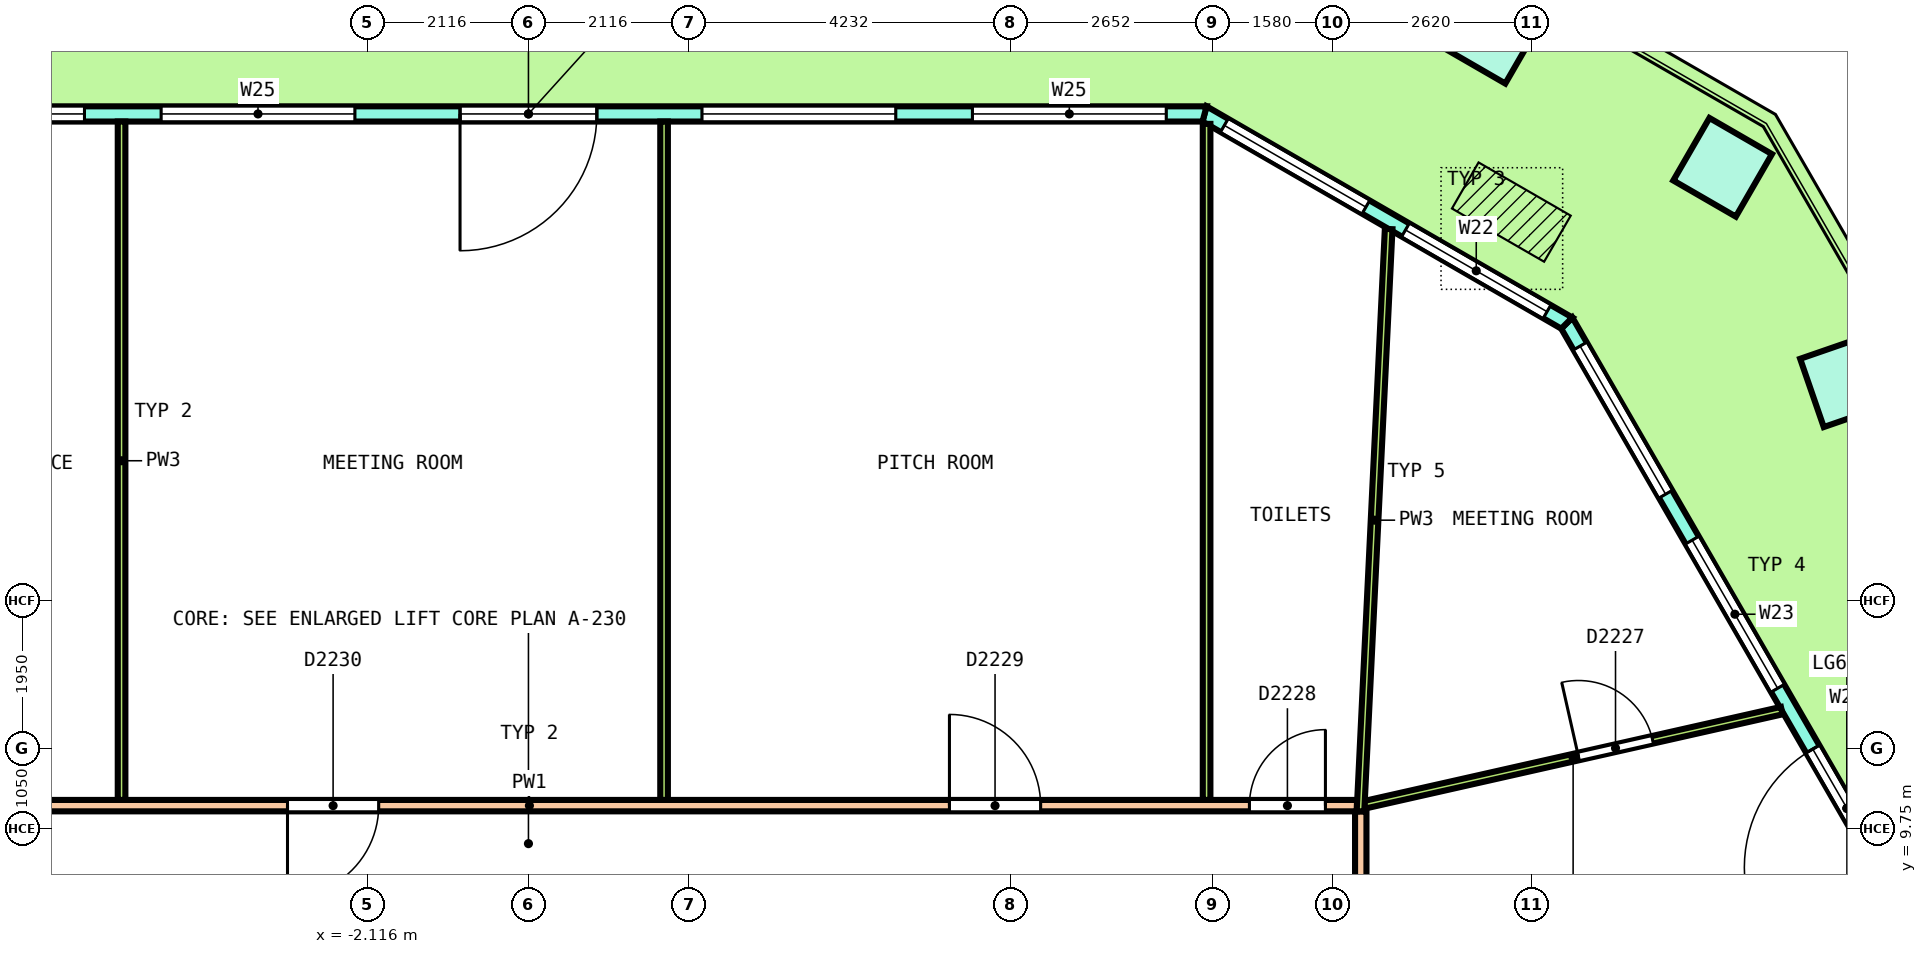
"""IFC4 building model, lengths in metres.
Left out: names, types, materials, properties, quantities, classifications, styles, units other than length and angle.
Written with IfcOpenShell. Run it as: python <this file> out.ifc"""

import sys

from ifc_helpers import new_model, si_unit, direction, frame, frame_2d, origin, origin_2d, place, context, subcontext, project, spatial, polyline, rectangle, outline, extrude, element, fill, save


model = new_model("IFC4")
c1 = context("Model", 3, precision=1e-05, world=origin(), true_north=direction((0.0, 1.0)))
c2 = subcontext(c1, "Body", "Model", "MODEL_VIEW")
j1 = project(units=[si_unit("LENGTHUNIT", "METRE"), si_unit("PLANEANGLEUNIT", "RADIAN")], contexts=[c1])
p1 = place(None, origin())
s1 = spatial("IfcSite", under=j1, at=p1, CompositionType="ELEMENT")
p2 = place(p1, origin())
s2 = spatial("IfcBuilding", under=s1, at=p2, CompositionType="ELEMENT")
p3 = place(p2, frame((0.0, 0.0, 291.0)))
s3 = spatial("IfcBuildingStorey", under=s2, at=p3, CompositionType="ELEMENT", Elevation=291.0)
p4 = place(p3, frame((17.335, 15.635, 0.0), z_axis=(0.032624119908, 0.006284154245, 0.999447935715), x_axis=(-0.499397268022, 0.866305114166, 0.010854393717)))
e1 = element("IfcColumn", 1, at=p4, inside=s3, PredefinedType="COLUMN", context=c2, shape_type="SweptSolid", body=[
    extrude(rectangle(XDim=0.95, YDim=0.95, at=origin_2d()), origin(), (0.0, 0.0, 1.0), 3.652),
])
for number, where, z_axis, x_axis in (
    (2, (15.711, 18.448, 0.0), (0.036, 0.0, 0.999), (-0.865, 0.5, 0.031)),
    (3, (12.678, 20.199, 0.0), (0.036, 0.0, 0.999), (-0.865, 0.5, 0.031)),
):
    element("IfcColumn", number, at=place(p3, frame(where, z_axis=z_axis, x_axis=x_axis)), inside=s3, PredefinedType="COLUMN", context=c2, shape_type="SweptSolid", body=[
        extrude(rectangle(XDim=0.95, YDim=0.95, at=origin_2d()), origin(), (0.0, 0.0, 1.0), 3.652),
    ])
p5 = place(p3, frame((21.032, 3.632, 0.0), z_axis=(0.0, 0.0, 1.0), x_axis=(-0.50000248076, 0.866023971512, 0.0)))
e4 = element("IfcWall", 4, at=p5, inside=s3, PredefinedType="SOLIDWALL", context=c2, shape_type="SweptSolid", body=[
    extrude(outline(polyline([(-0.027, -0.1), (1.03, -0.1), (2.087, -0.1), (3.144, -0.1), (4.2, -0.1), (5.257, -0.1), (6.314, -0.1), (7.371, -0.1), (8.428, -0.1), (9.484, -0.1), (10.541, -0.1), (11.598, -0.1), (12.655, -0.1), (13.712, -0.1), (14.769, -0.1), (14.715, 0.1), (13.666, 0.1), (12.616, 0.1), (11.567, 0.1), (10.518, 0.1), (9.469, 0.1), (8.42, 0.1), (7.371, 0.1), (6.322, 0.1), (5.272, 0.1), (4.223, 0.1), (3.174, 0.1), (2.125, 0.1), (1.076, 0.1), (0.027, 0.1), (-0.027, -0.1)])), origin(), (0.0, 0.0, 1.0), 3.7),
])
p6 = place(p5, frame((0.349, 0.0, 0.1)))
e5 = element("IfcOpeningElement", 5, at=p6, cuts=e4, PredefinedType="OPENING", context=c2, shape_type="SweptSolid", body=[
    extrude(rectangle(XDim=2.25, YDim=2.75, at=frame_2d((1.125, 1.375))), frame((0.0, 0.11, 0.0), z_axis=(0.0, -1.0, 0.0), x_axis=(1.0, 0.0, 0.0)), (0.0, 0.0, 1.0), 0.22),
])
p7 = place(p5, frame((3.298, 0.0, 0.1)))
e6 = element("IfcOpeningElement", 6, at=p7, cuts=e4, PredefinedType="OPENING", context=c2, shape_type="SweptSolid", body=[
    extrude(rectangle(XDim=2.25, YDim=2.75, at=frame_2d((1.125, 1.375))), frame((0.0, 0.11, 0.0), z_axis=(0.0, -1.0, 0.0), x_axis=(1.0, 0.0, 0.0)), (0.0, 0.0, 1.0), 0.22),
])
p8 = place(p5, frame((6.471, 0.0, 0.0)))
e7 = element("IfcOpeningElement", 7, at=p8, cuts=e4, PredefinedType="OPENING", context=c2, shape_type="SweptSolid", body=[
    extrude(rectangle(XDim=1.8, YDim=2.4, at=frame_2d((0.9, 1.2))), frame((0.0, 0.11, 0.0), z_axis=(0.0, -1.0, 0.0), x_axis=(1.0, 0.0, 0.0)), (0.0, 0.0, 1.0), 0.22),
])
p9 = place(p5, frame((6.471, 0.0, 2.55)))
e8 = element("IfcOpeningElement", 8, at=p9, cuts=e4, PredefinedType="OPENING", context=c2, shape_type="SweptSolid", body=[
    extrude(rectangle(XDim=1.8, YDim=0.3, at=frame_2d((0.9, 0.15))), frame((0.0, 0.11, 0.0), z_axis=(0.0, -1.0, 0.0), x_axis=(1.0, 0.0, 0.0)), (0.0, 0.0, 1.0), 0.22),
])
p10 = place(p5, frame((9.194, 0.0, 0.1)))
e9 = element("IfcOpeningElement", 9, at=p10, cuts=e4, PredefinedType="OPENING", context=c2, shape_type="SweptSolid", body=[
    extrude(rectangle(XDim=2.25, YDim=2.75, at=frame_2d((1.125, 1.375))), frame((0.0, 0.11, 0.0), z_axis=(0.0, -1.0, 0.0), x_axis=(1.0, 0.0, 0.0)), (0.0, 0.0, 1.0), 0.22),
])
p11 = place(p5, frame((12.143, 0.0, 0.1)))
e10 = element("IfcOpeningElement", 10, at=p11, cuts=e4, PredefinedType="OPENING", context=c2, shape_type="SweptSolid", body=[
    extrude(rectangle(XDim=2.25, YDim=2.75, at=frame_2d((1.125, 1.375))), frame((0.0, 0.11, 0.0), z_axis=(0.0, -1.0, 0.0), x_axis=(1.0, 0.0, 0.0)), (0.0, 0.0, 1.0), 0.22),
])
p12 = place(p3, frame((13.661, 16.398, 0.0), z_axis=(0.0, 0.0, 1.0), x_axis=(-0.866014926636, 0.500018146515, 0.0)))
e11 = element("IfcWall", 11, at=p12, inside=s3, PredefinedType="SOLIDWALL", context=c2, shape_type="SweptSolid", body=[
    extrude(outline(polyline([(-0.027, -0.1), (1.084, -0.1), (2.196, -0.1), (3.307, -0.1), (4.419, -0.1), (5.53, -0.1), (5.476, 0.1), (4.386, 0.1), (3.297, 0.1), (2.207, 0.1), (1.117, 0.1), (0.027, 0.1), (-0.027, -0.1)])), origin(), (0.0, 0.0, 1.0), 3.7),
])
p13 = place(p12, frame((0.301, 0.0, 0.1)))
e12 = element("IfcOpeningElement", 12, at=p13, cuts=e11, PredefinedType="OPENING", context=c2, shape_type="SweptSolid", body=[
    extrude(rectangle(XDim=2.15, YDim=2.75, at=frame_2d((1.075, 1.375))), frame((0.0, 0.11, 0.0), z_axis=(0.0, -1.0, 0.0), x_axis=(1.0, 0.0, 0.0)), (0.0, 0.0, 1.0), 0.22),
])
p14 = place(p12, frame((3.052, 0.0, 0.1)))
e13 = element("IfcOpeningElement", 13, at=p14, cuts=e11, PredefinedType="OPENING", context=c2, shape_type="SweptSolid", body=[
    extrude(rectangle(XDim=2.15, YDim=2.75, at=frame_2d((1.075, 1.375))), frame((0.0, 0.11, 0.0), z_axis=(0.0, -1.0, 0.0), x_axis=(1.0, 0.0, 0.0)), (0.0, 0.0, 1.0), 0.22),
])
p15 = place(p3, frame((8.895, 19.15, 0.0), z_axis=(0.0, 0.0, 1.0), x_axis=(-1.0, 0.0, 0.0)))
e14 = element("IfcWall", 14, at=p15, inside=s3, PredefinedType="SOLIDWALL", context=c2, shape_type="SweptSolid", body=[
    extrude(outline(polyline([(-0.027, -0.1), (1.023, -0.1), (2.073, -0.1), (3.122, -0.1), (4.172, -0.1), (5.221, -0.1), (6.271, -0.1), (7.321, -0.1), (8.37, -0.1), (9.42, -0.1), (10.469, -0.1), (11.519, -0.1), (12.569, -0.1), (13.618, -0.1), (14.668, -0.1), (15.718, -0.1), (16.767, -0.1), (17.817, -0.1), (17.763, 0.1), (16.72, 0.1), (15.677, 0.1), (14.633, 0.1), (13.59, 0.1), (12.547, 0.1), (11.503, 0.1), (10.46, 0.1), (9.417, 0.1), (8.373, 0.1), (7.33, 0.1), (6.287, 0.1), (5.243, 0.1), (4.2, 0.1), (3.157, 0.1), (2.114, 0.1), (1.07, 0.1), (0.027, 0.1), (-0.027, -0.1)])), origin(), (0.0, 0.0, 1.0), 3.7),
])
p16 = place(p15, frame((0.504, 0.0, 0.1)))
e15 = element("IfcOpeningElement", 15, at=p16, cuts=e14, PredefinedType="OPENING", context=c2, shape_type="SweptSolid", body=[
    extrude(rectangle(XDim=2.55, YDim=2.75, at=frame_2d((1.275, 1.375))), frame((0.0, 0.11, 0.0), z_axis=(0.0, -1.0, 0.0), x_axis=(1.0, 0.0, 0.0)), (0.0, 0.0, 1.0), 0.22),
])
p17 = place(p15, frame((4.062, 0.0, 0.1)))
e16 = element("IfcOpeningElement", 16, at=p17, cuts=e14, PredefinedType="OPENING", context=c2, shape_type="SweptSolid", body=[
    extrude(rectangle(XDim=2.55, YDim=2.75, at=frame_2d((1.275, 1.375))), frame((0.0, 0.11, 0.0), z_axis=(0.0, -1.0, 0.0), x_axis=(1.0, 0.0, 0.0)), (0.0, 0.0, 1.0), 0.22),
])
p18 = place(p15, frame((7.995, 0.0, 0.0)))
e17 = element("IfcOpeningElement", 17, at=p18, cuts=e14, PredefinedType="OPENING", context=c2, shape_type="SweptSolid", body=[
    extrude(rectangle(XDim=1.8, YDim=2.4, at=frame_2d((0.9, 1.2))), frame((0.0, 0.11, 0.0), z_axis=(0.0, -1.0, 0.0), x_axis=(1.0, 0.0, 0.0)), (0.0, 0.0, 1.0), 0.22),
])
p19 = place(p15, frame((7.995, 0.0, 2.55)))
e18 = element("IfcOpeningElement", 18, at=p19, cuts=e14, PredefinedType="OPENING", context=c2, shape_type="SweptSolid", body=[
    extrude(rectangle(XDim=1.8, YDim=0.3, at=frame_2d((0.9, 0.15))), frame((0.0, 0.11, 0.0), z_axis=(0.0, -1.0, 0.0), x_axis=(1.0, 0.0, 0.0)), (0.0, 0.0, 1.0), 0.22),
])
p20 = place(p15, frame((11.178, 0.0, 0.1)))
e19 = element("IfcOpeningElement", 19, at=p20, cuts=e14, PredefinedType="OPENING", context=c2, shape_type="SweptSolid", body=[
    extrude(rectangle(XDim=2.55, YDim=2.75, at=frame_2d((1.275, 1.375))), frame((0.0, 0.11, 0.0), z_axis=(0.0, -1.0, 0.0), x_axis=(1.0, 0.0, 0.0)), (0.0, 0.0, 1.0), 0.22),
])
p21 = place(p15, frame((14.736, 0.0, 0.1)))
e20 = element("IfcOpeningElement", 20, at=p21, cuts=e14, PredefinedType="OPENING", context=c2, shape_type="SweptSolid", body=[
    extrude(rectangle(XDim=2.55, YDim=2.75, at=frame_2d((1.275, 1.375))), frame((0.0, 0.11, 0.0), z_axis=(0.0, -1.0, 0.0), x_axis=(1.0, 0.0, 0.0)), (0.0, 0.0, 1.0), 0.22),
])
p22 = place(p3, frame((10.95, -7.025, 0.0), z_axis=(0.0, 0.0, 1.0), x_axis=(0.0, 1.0, 0.0)))
e21 = element("IfcWall", 21, at=p22, inside=s3, PredefinedType="PARTITIONING", context=c2, shape_type="SweptSolid", body=[
    extrude(rectangle(XDim=17.0, YDim=0.15, at=frame_2d((8.5, 0.0))), origin(), (0.0, 0.0, 1.0), 2.9),
])
p23 = place(p22, frame((8.632, 0.0, 0.0)))
e22 = element("IfcOpeningElement", 22, at=p23, cuts=e21, PredefinedType="OPENING", context=c2, shape_type="SweptSolid", body=[
    extrude(rectangle(XDim=1.0, YDim=2.1, at=frame_2d((0.5, 1.05))), frame((0.0, 0.085, 0.0), z_axis=(0.0, -1.0, 0.0), x_axis=(1.0, 0.0, 0.0)), (0.0, 0.0, 1.0), 0.17),
])
p24 = place(p22, frame((12.605, 0.0, 0.0)))
e23 = element("IfcOpeningElement", 23, at=p24, cuts=e21, PredefinedType="OPENING", context=c2, shape_type="SweptSolid", body=[
    extrude(rectangle(XDim=1.2, YDim=2.1, at=frame_2d((0.6, 1.05))), frame((0.0, 0.085, 0.0), z_axis=(0.0, -1.0, 0.0), x_axis=(1.0, 0.0, 0.0)), (0.0, 0.0, 1.0), 0.17),
])
p25 = place(p22, frame((2.733, 0.0, 0.0)))
e24 = element("IfcOpeningElement", 24, at=p25, cuts=e21, PredefinedType="OPENING", context=c2, shape_type="SweptSolid", body=[
    extrude(rectangle(XDim=1.0, YDim=2.1, at=frame_2d((0.5, 1.05))), frame((0.0, 0.085, 0.0), z_axis=(0.0, -1.0, 0.0), x_axis=(1.0, 0.0, 0.0)), (0.0, 0.0, 1.0), 0.17),
])
p26 = place(p22, frame((5.854, 0.0, 0.0)))
e25 = element("IfcOpeningElement", 25, at=p26, cuts=e21, PredefinedType="OPENING", context=c2, shape_type="SweptSolid", body=[
    extrude(rectangle(XDim=1.0, YDim=2.1, at=frame_2d((0.5, 1.05))), frame((0.0, 0.085, 0.0), z_axis=(0.0, -1.0, 0.0), x_axis=(1.0, 0.0, 0.0)), (0.0, 0.0, 1.0), 0.17),
])
p27 = place(p3, frame((-10.875, 10.05, 0.0), z_axis=(0.0, 0.0, 1.0), x_axis=(1.0, 0.0, 0.0)))
e26 = element("IfcWall", 26, at=p27, inside=s3, PredefinedType="PARTITIONING", context=c2, shape_type="SweptSolid", body=[
    extrude(rectangle(XDim=21.775, YDim=0.15, at=frame_2d((10.887, 0.0))), origin(), (0.0, 0.0, 1.0), 2.9),
])
p28 = place(p27, frame((20.36, 0.0, 0.0)))
e27 = element("IfcOpeningElement", 27, at=p28, cuts=e26, PredefinedType="OPENING", context=c2, shape_type="SweptSolid", body=[
    extrude(rectangle(XDim=1.0, YDim=2.1, at=frame_2d((0.5, 1.05))), frame((0.0, 0.085, 0.0), z_axis=(0.0, -1.0, 0.0), x_axis=(1.0, 0.0, 0.0)), (0.0, 0.0, 1.0), 0.17),
])
p29 = place(p27, frame((16.414, 0.0, 0.0)))
e28 = element("IfcOpeningElement", 28, at=p29, cuts=e26, PredefinedType="OPENING", context=c2, shape_type="SweptSolid", body=[
    extrude(rectangle(XDim=1.2, YDim=2.1, at=frame_2d((0.6, 1.05))), frame((0.0, 0.085, 0.0), z_axis=(0.0, -1.0, 0.0), x_axis=(1.0, 0.0, 0.0)), (0.0, 0.0, 1.0), 0.17),
])
p30 = place(p27, frame((7.705, 0.0, 0.0)))
e29 = element("IfcOpeningElement", 29, at=p30, cuts=e26, PredefinedType="OPENING", context=c2, shape_type="SweptSolid", body=[
    extrude(rectangle(XDim=1.2, YDim=2.1, at=frame_2d((0.6, 1.05))), frame((0.0, 0.085, 0.0), z_axis=(0.0, -1.0, 0.0), x_axis=(1.0, 0.0, 0.0)), (0.0, 0.0, 1.0), 0.17),
])
p31 = place(p27, frame((2.771, 0.0, 0.0)))
e30 = element("IfcOpeningElement", 30, at=p31, cuts=e26, PredefinedType="OPENING", context=c2, shape_type="SweptSolid", body=[
    extrude(rectangle(XDim=1.0, YDim=2.1, at=frame_2d((0.5, 1.05))), frame((0.0, 0.085, 0.0), z_axis=(0.0, -1.0, 0.0), x_axis=(1.0, 0.0, 0.0)), (0.0, 0.0, 1.0), 0.17),
])
p32 = place(p3, frame((10.999, 10.061, 0.0), z_axis=(0.0, 0.0, 1.0), x_axis=(0.975459036703, 0.220180988541, 0.0)))
e31 = element("IfcWall", 31, at=p32, inside=s3, PredefinedType="PARTITIONING", context=c2, shape_type="SweptSolid", body=[
    extrude(rectangle(XDim=5.628, YDim=0.1, at=frame_2d((2.814, 0.0))), origin(), (0.0, 0.0, 1.0), 2.9),
])
p33 = place(p32, frame((2.886, 0.0, 0.0)))
e32 = element("IfcOpeningElement", 32, at=p33, cuts=e31, PredefinedType="OPENING", context=c2, shape_type="SweptSolid", body=[
    extrude(rectangle(XDim=1.0, YDim=2.1, at=frame_2d((0.5, 1.05))), frame((0.0, 0.06, 0.0), z_axis=(0.0, -1.0, 0.0), x_axis=(1.0, 0.0, 0.0)), (0.0, 0.0, 1.0), 0.12),
])
p34 = place(p3, frame((10.946, 9.975, 0.0), z_axis=(0.0, 0.0, 1.0), x_axis=(0.048351551891, 0.998830379709, 0.0)))
e33 = element("IfcWall", 33, at=p34, inside=s3, PredefinedType="PARTITIONING", context=c2, shape_type="SweptSolid", body=[
    extrude(rectangle(XDim=7.67, YDim=0.1, at=frame_2d((3.835, 0.0))), origin(), (0.0, 0.0, 1.0), 2.9),
])
p35 = place(p3, frame((8.922, 10.125, 0.0), z_axis=(0.0, 0.0, 1.0), x_axis=(0.0, 1.0, 0.0)))
e34 = element("IfcWall", 34, at=p35, inside=s3, PredefinedType="PARTITIONING", context=c2, shape_type="SweptSolid", body=[
    extrude(rectangle(XDim=8.894, YDim=0.1, at=frame_2d((4.447, 0.0))), origin(), (0.0, 0.0, 1.0), 2.9),
])
for number, where, z_axis, x_axis in (
    (35, (1.784, 10.125, 0.0), (0.0, 0.0, 1.0), (0.0, 1.0, 0.0)),
    (36, (-5.353, 10.125, 0.0), (0.0, 0.0, 1.0), (0.0, 1.0, 0.0)),
):
    element("IfcWall", number, at=place(p3, frame(where, z_axis=z_axis, x_axis=x_axis)), inside=s3, PredefinedType="PARTITIONING", context=c2, shape_type="SweptSolid", body=[
        extrude(rectangle(XDim=8.925, YDim=0.1, at=frame_2d((4.462, 0.0))), origin(), (0.0, 0.0, 1.0), 2.9),
    ])
p36 = place(p8, origin())
e37 = element("IfcDoor", 37, at=p36, inside=s3, OperationType="DOUBLE_DOOR_SINGLE_SWING", PredefinedType="DOOR", context=c2, shape_type="SweptSolid", body=[
    extrude(rectangle(XDim=1.8, YDim=2.4, at=frame_2d((0.9, 1.2))), frame((0.0, 0.025, 0.0), z_axis=(0.0, -1.0, 0.0), x_axis=(1.0, 0.0, 0.0)), (0.0, 0.0, 1.0), 0.05),
])
fill(e7, e37)
p37 = place(p9, origin())
e38 = element("IfcWindow", 38, at=p37, inside=s3, PartitioningType="SINGLE_PANEL", PredefinedType="WINDOW", context=c2, shape_type="SweptSolid", body=[
    extrude(rectangle(XDim=1.8, YDim=0.3, at=frame_2d((0.9, 0.15))), frame((0.0, 0.03, 0.0), z_axis=(0.0, -1.0, 0.0), x_axis=(1.0, 0.0, 0.0)), (0.0, 0.0, 1.0), 0.06),
])
fill(e8, e38)
p38 = place(p10, origin())
e39 = element("IfcWindow", 39, at=p38, inside=s3, PartitioningType="SINGLE_PANEL", PredefinedType="WINDOW", context=c2, shape_type="SweptSolid", body=[
    extrude(rectangle(XDim=2.25, YDim=2.75, at=frame_2d((1.125, 1.375))), frame((0.0, 0.03, 0.0), z_axis=(0.0, -1.0, 0.0), x_axis=(1.0, 0.0, 0.0)), (0.0, 0.0, 1.0), 0.06),
])
fill(e9, e39)
p39 = place(p11, origin())
e40 = element("IfcWindow", 40, at=p39, inside=s3, PartitioningType="SINGLE_PANEL", PredefinedType="WINDOW", context=c2, shape_type="SweptSolid", body=[
    extrude(rectangle(XDim=2.25, YDim=2.75, at=frame_2d((1.125, 1.375))), frame((0.0, 0.03, 0.0), z_axis=(0.0, -1.0, 0.0), x_axis=(1.0, 0.0, 0.0)), (0.0, 0.0, 1.0), 0.06),
])
fill(e10, e40)
p40 = place(p13, origin())
e41 = element("IfcWindow", 41, at=p40, inside=s3, PartitioningType="SINGLE_PANEL", PredefinedType="WINDOW", context=c2, shape_type="SweptSolid", body=[
    extrude(rectangle(XDim=2.15, YDim=2.75, at=frame_2d((1.075, 1.375))), frame((0.0, 0.03, 0.0), z_axis=(0.0, -1.0, 0.0), x_axis=(1.0, 0.0, 0.0)), (0.0, 0.0, 1.0), 0.06),
])
fill(e12, e41)
p41 = place(p14, origin())
e42 = element("IfcWindow", 42, at=p41, inside=s3, PartitioningType="SINGLE_PANEL", PredefinedType="WINDOW", context=c2, shape_type="SweptSolid", body=[
    extrude(rectangle(XDim=2.15, YDim=2.75, at=frame_2d((1.075, 1.375))), frame((0.0, 0.03, 0.0), z_axis=(0.0, -1.0, 0.0), x_axis=(1.0, 0.0, 0.0)), (0.0, 0.0, 1.0), 0.06),
])
fill(e13, e42)
p42 = place(p16, origin())
e43 = element("IfcWindow", 43, at=p42, inside=s3, PartitioningType="SINGLE_PANEL", PredefinedType="WINDOW", context=c2, shape_type="SweptSolid", body=[
    extrude(rectangle(XDim=2.55, YDim=2.75, at=frame_2d((1.275, 1.375))), frame((0.0, 0.03, 0.0), z_axis=(0.0, -1.0, 0.0), x_axis=(1.0, 0.0, 0.0)), (0.0, 0.0, 1.0), 0.06),
])
fill(e15, e43)
p43 = place(p17, origin())
e44 = element("IfcWindow", 44, at=p43, inside=s3, PartitioningType="SINGLE_PANEL", PredefinedType="WINDOW", context=c2, shape_type="SweptSolid", body=[
    extrude(rectangle(XDim=2.55, YDim=2.75, at=frame_2d((1.275, 1.375))), frame((0.0, 0.03, 0.0), z_axis=(0.0, -1.0, 0.0), x_axis=(1.0, 0.0, 0.0)), (0.0, 0.0, 1.0), 0.06),
])
fill(e16, e44)
p44 = place(p18, origin())
e45 = element("IfcDoor", 45, at=p44, inside=s3, OperationType="DOUBLE_DOOR_SINGLE_SWING", PredefinedType="DOOR", context=c2, shape_type="SweptSolid", body=[
    extrude(rectangle(XDim=1.8, YDim=2.4, at=frame_2d((0.9, 1.2))), frame((0.0, 0.025, 0.0), z_axis=(0.0, -1.0, 0.0), x_axis=(1.0, 0.0, 0.0)), (0.0, 0.0, 1.0), 0.05),
])
fill(e17, e45)
p45 = place(p19, origin())
e46 = element("IfcWindow", 46, at=p45, inside=s3, PartitioningType="SINGLE_PANEL", PredefinedType="WINDOW", context=c2, shape_type="SweptSolid", body=[
    extrude(rectangle(XDim=1.8, YDim=0.3, at=frame_2d((0.9, 0.15))), frame((0.0, 0.03, 0.0), z_axis=(0.0, -1.0, 0.0), x_axis=(1.0, 0.0, 0.0)), (0.0, 0.0, 1.0), 0.06),
])
fill(e18, e46)
p46 = place(p20, origin())
e47 = element("IfcWindow", 47, at=p46, inside=s3, PartitioningType="SINGLE_PANEL", PredefinedType="WINDOW", context=c2, shape_type="SweptSolid", body=[
    extrude(rectangle(XDim=2.55, YDim=2.75, at=frame_2d((1.275, 1.375))), frame((0.0, 0.03, 0.0), z_axis=(0.0, -1.0, 0.0), x_axis=(1.0, 0.0, 0.0)), (0.0, 0.0, 1.0), 0.06),
])
fill(e19, e47)
p47 = place(p21, origin())
e48 = element("IfcWindow", 48, at=p47, inside=s3, PartitioningType="SINGLE_PANEL", PredefinedType="WINDOW", context=c2, shape_type="SweptSolid", body=[
    extrude(rectangle(XDim=2.55, YDim=2.75, at=frame_2d((1.275, 1.375))), frame((0.0, 0.03, 0.0), z_axis=(0.0, -1.0, 0.0), x_axis=(1.0, 0.0, 0.0)), (0.0, 0.0, 1.0), 0.06),
])
fill(e20, e48)
p48 = place(p33, origin())
e49 = element("IfcDoor", 49, at=p48, inside=s3, OperationType="SINGLE_SWING_LEFT", PredefinedType="DOOR", context=c2, shape_type="SweptSolid", body=[
    extrude(rectangle(XDim=1.0, YDim=2.1, at=frame_2d((0.5, 1.05))), frame((0.0, 0.025, 0.0), z_axis=(0.0, -1.0, 0.0), x_axis=(1.0, 0.0, 0.0)), (0.0, 0.0, 1.0), 0.05),
])
fill(e32, e49)
p49 = place(p28, origin())
e50 = element("IfcDoor", 50, at=p49, inside=s3, OperationType="SINGLE_SWING_RIGHT", PredefinedType="DOOR", context=c2, shape_type="SweptSolid", body=[
    extrude(rectangle(XDim=1.0, YDim=2.1, at=frame_2d((0.5, 1.05))), frame((0.0, 0.025, 0.0), z_axis=(0.0, -1.0, 0.0), x_axis=(1.0, 0.0, 0.0)), (0.0, 0.0, 1.0), 0.05),
])
fill(e27, e50)
p50 = place(p29, origin())
e51 = element("IfcDoor", 51, at=p50, inside=s3, OperationType="DOUBLE_DOOR_SINGLE_SWING", PredefinedType="DOOR", context=c2, shape_type="SweptSolid", body=[
    extrude(rectangle(XDim=1.2, YDim=2.1, at=frame_2d((0.6, 1.05))), frame((0.0, 0.025, 0.0), z_axis=(0.0, -1.0, 0.0), x_axis=(1.0, 0.0, 0.0)), (0.0, 0.0, 1.0), 0.05),
])
fill(e28, e51)
p51 = place(p30, origin())
e52 = element("IfcDoor", 52, at=p51, inside=s3, OperationType="DOUBLE_DOOR_SINGLE_SWING", PredefinedType="DOOR", context=c2, shape_type="SweptSolid", body=[
    extrude(rectangle(XDim=1.2, YDim=2.1, at=frame_2d((0.6, 1.05))), frame((0.0, 0.025, 0.0), z_axis=(0.0, -1.0, 0.0), x_axis=(1.0, 0.0, 0.0)), (0.0, 0.0, 1.0), 0.05),
])
fill(e29, e52)
save(model, sys.argv[1])
